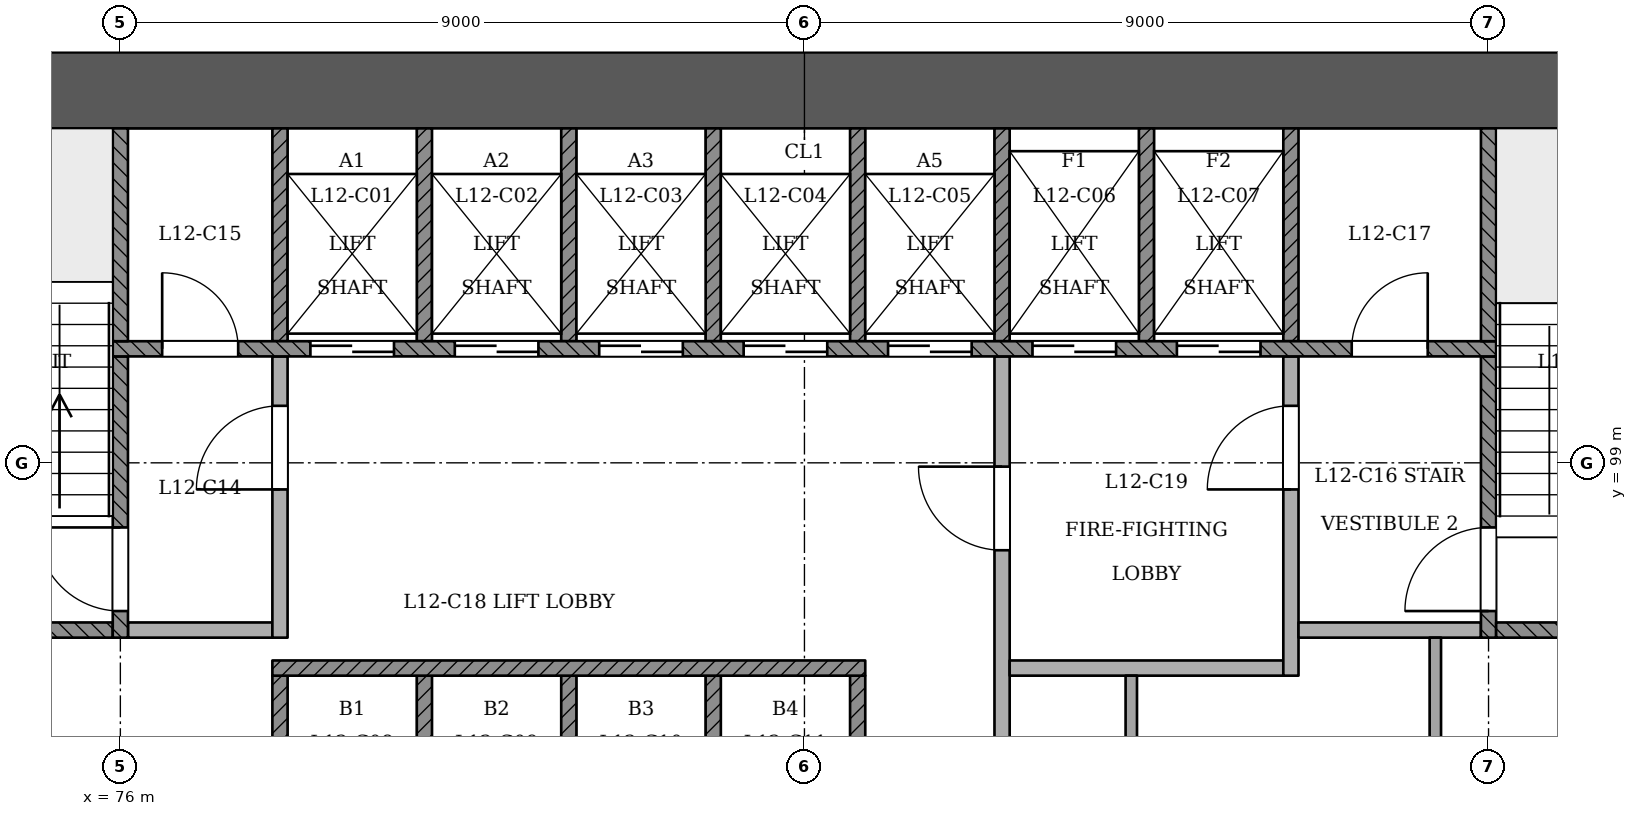
"""IFC4 building model, lengths in metres.
Left out: names, types, materials, properties, quantities, classifications, styles, units other than length and angle.
Written with IfcOpenShell. Run it as: python <this file> out.ifc"""

import sys

from ifc_helpers import new_model, si_unit, direction, frame, frame_2d, origin, place, context, subcontext, project, spatial, rectangle, extrude, element, fill, save


model = new_model("IFC4")
c1 = context("Model", 3, precision=1e-05, world=origin(), true_north=direction((0.0, 1.0)))
c2 = subcontext(c1, "Body", "Model", "MODEL_VIEW")
j1 = project(units=[si_unit("LENGTHUNIT", "METRE"), si_unit("PLANEANGLEUNIT", "RADIAN")], contexts=[c1])
p1 = place(None, origin())
s1 = spatial("IfcSite", under=j1, at=p1, CompositionType="ELEMENT")
p2 = place(p1, origin())
s2 = spatial("IfcBuilding", under=s1, at=p2, CompositionType="ELEMENT")
p3 = place(p2, frame((0.0, 0.0, 52.2)))
s3 = spatial("IfcBuildingStorey", under=s2, at=p3, CompositionType="ELEMENT", Elevation=52.2)
p4 = place(p3, frame((97.5, 103.9, 0.0), z_axis=(0.0, 0.0, 1.0), x_axis=(-1.0, 0.0, 0.0)))
e1 = element("IfcWall", 1, at=p4, inside=s3, PredefinedType="SHEAR", context=c2, shape_type="SweptSolid", body=[
    extrude(rectangle(XDim=25.5, YDim=1.0, at=frame_2d((12.75, 0.0))), origin(), (0.0, 0.0, 1.0), 3.6),
])
p5 = place(p3, frame((86.05, 58.757, 0.0), z_axis=(0.0, 0.0, 1.0), x_axis=(0.499999296855, 0.866025809745, 0.0)))
e2 = element("IfcWall", 2, at=p5, inside=s3, PredefinedType="PARTITIONING", context=c2, shape_type="SweptSolid", body=[
    extrude(rectangle(XDim=43.792, YDim=0.15, at=frame_2d((21.896, 0.0))), origin(), (0.0, 0.0, 1.0), 2.7),
])
p6 = place(p5, frame((3.598, 0.0, 0.0)))
e3 = element("IfcOpeningElement", 3, at=p6, cuts=e2, PredefinedType="OPENING", context=c2, shape_type="SweptSolid", body=[
    extrude(rectangle(XDim=1.2, YDim=2.1, at=frame_2d((0.6, 1.05))), frame((0.0, 0.085, 0.0), z_axis=(0.0, -1.0, 0.0), x_axis=(1.0, 0.0, 0.0)), (0.0, 0.0, 1.0), 0.171),
])
p7 = place(p5, frame((11.176, 0.0, 0.0)))
e4 = element("IfcOpeningElement", 4, at=p7, cuts=e2, PredefinedType="OPENING", context=c2, shape_type="SweptSolid", body=[
    extrude(rectangle(XDim=1.0, YDim=2.1, at=frame_2d((0.5, 1.05))), frame((0.0, 0.085, 0.0), z_axis=(0.0, -1.0, 0.0), x_axis=(1.0, 0.0, 0.0)), (0.0, 0.0, 1.0), 0.171),
])
p8 = place(p5, frame((13.616, 0.0, 0.0)))
e5 = element("IfcOpeningElement", 5, at=p8, cuts=e2, PredefinedType="OPENING", context=c2, shape_type="SweptSolid", body=[
    extrude(rectangle(XDim=1.0, YDim=2.1, at=frame_2d((0.5, 1.05))), frame((0.0, 0.085, 0.0), z_axis=(0.0, -1.0, 0.0), x_axis=(1.0, 0.0, 0.0)), (0.0, 0.0, 1.0), 0.171),
])
p9 = place(p5, frame((20.176, 0.0, 0.0)))
e6 = element("IfcOpeningElement", 6, at=p9, cuts=e2, PredefinedType="OPENING", context=c2, shape_type="SweptSolid", body=[
    extrude(rectangle(XDim=1.0, YDim=2.1, at=frame_2d((0.5, 1.05))), frame((0.0, 0.085, 0.0), z_axis=(0.0, -1.0, 0.0), x_axis=(1.0, 0.0, 0.0)), (0.0, 0.0, 1.0), 0.171),
])
p10 = place(p5, frame((22.616, 0.0, 0.0)))
e7 = element("IfcOpeningElement", 7, at=p10, cuts=e2, PredefinedType="OPENING", context=c2, shape_type="SweptSolid", body=[
    extrude(rectangle(XDim=1.0, YDim=2.1, at=frame_2d((0.5, 1.05))), frame((0.0, 0.085, 0.0), z_axis=(0.0, -1.0, 0.0), x_axis=(1.0, 0.0, 0.0)), (0.0, 0.0, 1.0), 0.171),
])
p11 = place(p5, frame((29.176, 0.0, 0.0)))
e8 = element("IfcOpeningElement", 8, at=p11, cuts=e2, PredefinedType="OPENING", context=c2, shape_type="SweptSolid", body=[
    extrude(rectangle(XDim=1.0, YDim=2.1, at=frame_2d((0.5, 1.05))), frame((0.0, 0.085, 0.0), z_axis=(0.0, -1.0, 0.0), x_axis=(1.0, 0.0, 0.0)), (0.0, 0.0, 1.0), 0.171),
])
p12 = place(p5, frame((31.616, 0.0, 0.0)))
e9 = element("IfcOpeningElement", 9, at=p12, cuts=e2, PredefinedType="OPENING", context=c2, shape_type="SweptSolid", body=[
    extrude(rectangle(XDim=1.0, YDim=2.1, at=frame_2d((0.5, 1.05))), frame((0.0, 0.085, 0.0), z_axis=(0.0, -1.0, 0.0), x_axis=(1.0, 0.0, 0.0)), (0.0, 0.0, 1.0), 0.171),
])
p13 = place(p5, frame((38.176, 0.0, 0.0)))
e10 = element("IfcOpeningElement", 10, at=p13, cuts=e2, PredefinedType="OPENING", context=c2, shape_type="SweptSolid", body=[
    extrude(rectangle(XDim=1.0, YDim=2.1, at=frame_2d((0.5, 1.05))), frame((0.0, 0.085, 0.0), z_axis=(0.0, -1.0, 0.0), x_axis=(1.0, 0.0, 0.0)), (0.0, 0.0, 1.0), 0.171),
])
p14 = place(p5, frame((41.344, 0.0, 0.0)))
e11 = element("IfcOpeningElement", 11, at=p14, cuts=e2, PredefinedType="OPENING", context=c2, shape_type="SweptSolid", body=[
    extrude(rectangle(XDim=1.0, YDim=2.1, at=frame_2d((0.5, 1.05))), frame((0.0, 0.085, 0.0), z_axis=(0.0, -1.0, 0.0), x_axis=(1.0, 0.0, 0.0)), (0.0, 0.0, 1.0), 0.171),
])
for number, where, z_axis, x_axis in (
    (12, (78.1, 93.4, 0.0), (0.0, 0.0, 1.0), (0.0, 1.0, 0.0)),
    (13, (80.0, 93.4, 0.0), (0.0, 0.0, 1.0), (0.0, 1.0, 0.0)),
    (14, (81.9, 93.4, 0.0), (0.0, 0.0, 1.0), (0.0, 1.0, 0.0)),
    (15, (83.8, 93.4, 0.0), (0.0, 0.0, 1.0), (0.0, 1.0, 0.0)),
    (16, (85.7, 93.4, 0.0), (0.0, 0.0, 1.0), (0.0, 1.0, 0.0)),
):
    element("IfcWall", number, at=place(p3, frame(where, z_axis=z_axis, x_axis=x_axis)), inside=s3, PredefinedType="SOLIDWALL", context=c2, shape_type="SweptSolid", body=[
        extrude(rectangle(XDim=2.8, YDim=0.2, at=frame_2d((1.4, 0.0))), origin(), (0.0, 0.0, 1.0), 3.1),
    ])
p15 = place(p3, frame((87.6, 93.4, 0.0), z_axis=(0.0, 0.0, 1.0), x_axis=(0.0, 1.0, 0.0)))
e17 = element("IfcWall", 17, at=p15, inside=s3, PredefinedType="PARTITIONING", context=c2, shape_type="SweptSolid", body=[
    extrude(rectangle(XDim=7.0, YDim=0.2, at=frame_2d((3.5, 0.0))), origin(), (0.0, 0.0, 1.0), 3.1),
])
p16 = place(p15, frame((4.45, 0.0, 0.0)))
e18 = element("IfcOpeningElement", 18, at=p16, cuts=e17, PredefinedType="OPENING", context=c2, shape_type="SweptSolid", body=[
    extrude(rectangle(XDim=1.1, YDim=2.1, at=frame_2d((0.55, 1.05))), frame((0.0, 0.11, 0.0), z_axis=(0.0, -1.0, 0.0), x_axis=(1.0, 0.0, 0.0)), (0.0, 0.0, 1.0), 0.221),
])
p17 = place(p3, frame((89.3, 93.4, 0.0), z_axis=(0.0, 0.0, 1.0), x_axis=(0.0, 1.0, 0.0)))
e19 = element("IfcWall", 19, at=p17, inside=s3, PredefinedType="PARTITIONING", context=c2, shape_type="SweptSolid", body=[
    extrude(rectangle(XDim=2.8, YDim=0.15, at=frame_2d((1.4, 0.0))), origin(), (0.0, 0.0, 1.0), 3.1),
])
p18 = place(p3, frame((93.3, 93.4, 0.0), z_axis=(0.0, 0.0, 1.0), x_axis=(0.0, 1.0, 0.0)))
e20 = element("IfcWall", 20, at=p18, inside=s3, PredefinedType="PARTITIONING", context=c2, shape_type="SweptSolid", body=[
    extrude(rectangle(XDim=3.3, YDim=0.15, at=frame_2d((1.65, 0.0))), origin(), (0.0, 0.0, 1.0), 3.1),
])
p19 = place(p3, frame((78.0, 96.3, 0.0), z_axis=(0.0, 0.0, 1.0), x_axis=(1.0, 0.0, 0.0)))
e21 = element("IfcWall", 21, at=p19, inside=s3, PredefinedType="SOLIDWALL", context=c2, shape_type="SweptSolid", body=[
    extrude(rectangle(XDim=7.8, YDim=0.2, at=frame_2d((3.9, 0.0))), origin(), (0.0, 0.0, 1.0), 3.1),
])
p20 = place(p3, frame((87.7, 96.3, 0.0), z_axis=(0.0, 0.0, 1.0), x_axis=(1.0, 0.0, 0.0)))
e22 = element("IfcWall", 22, at=p20, inside=s3, PredefinedType="PARTITIONING", context=c2, shape_type="SweptSolid", body=[
    extrude(rectangle(XDim=3.6, YDim=0.2, at=frame_2d((1.8, 0.0))), origin(), (0.0, 0.0, 1.0), 3.1),
])
p21 = place(p3, frame((91.4, 96.2, 0.0), z_axis=(0.0, 0.0, 1.0), x_axis=(0.0, 1.0, 0.0)))
e23 = element("IfcWall", 23, at=p21, inside=s3, PredefinedType="PARTITIONING", context=c2, shape_type="SweptSolid", body=[
    extrude(rectangle(XDim=4.2, YDim=0.2, at=frame_2d((2.1, 0.0))), origin(), (0.0, 0.0, 1.0), 3.1),
])
p22 = place(p21, frame((2.45, 0.0, 0.0)))
e24 = element("IfcOpeningElement", 24, at=p22, cuts=e23, PredefinedType="OPENING", context=c2, shape_type="SweptSolid", body=[
    extrude(rectangle(XDim=1.1, YDim=2.1, at=frame_2d((0.55, 1.05))), frame((0.0, 0.11, 0.0), z_axis=(0.0, -1.0, 0.0), x_axis=(1.0, 0.0, 0.0)), (0.0, 0.0, 1.0), 0.221),
])
p23 = place(p3, frame((73.0, 96.8, 0.0), z_axis=(0.0, 0.0, 1.0), x_axis=(1.0, 0.0, 0.0)))
e25 = element("IfcWall", 25, at=p23, inside=s3, PredefinedType="SOLIDWALL", context=c2, shape_type="SweptSolid", body=[
    extrude(rectangle(XDim=2.9, YDim=0.2, at=frame_2d((1.45, 0.0))), origin(), (0.0, 0.0, 1.0), 3.1),
])
p24 = place(p3, frame((76.0, 96.7, 0.0), z_axis=(0.0, 0.0, 1.0), x_axis=(0.0, 1.0, 0.0)))
e26 = element("IfcWall", 26, at=p24, inside=s3, PredefinedType="SOLIDWALL", context=c2, shape_type="SweptSolid", body=[
    extrude(rectangle(XDim=3.7, YDim=0.2, at=frame_2d((1.85, 0.0))), origin(), (0.0, 0.0, 1.0), 3.1),
])
p25 = place(p24, frame((0.35, 0.0, 0.0)))
e27 = element("IfcOpeningElement", 27, at=p25, cuts=e26, PredefinedType="OPENING", context=c2, shape_type="SweptSolid", body=[
    extrude(rectangle(XDim=1.1, YDim=2.1, at=frame_2d((0.55, 1.05))), frame((0.0, 0.11, 0.0), z_axis=(0.0, -1.0, 0.0), x_axis=(1.0, 0.0, 0.0)), (0.0, 0.0, 1.0), 0.221),
])
p26 = place(p3, frame((76.1, 96.8, 0.0), z_axis=(0.0, 0.0, 1.0), x_axis=(1.0, 0.0, 0.0)))
e28 = element("IfcWall", 28, at=p26, inside=s3, PredefinedType="PARTITIONING", context=c2, shape_type="SweptSolid", body=[
    extrude(rectangle(XDim=1.9, YDim=0.2, at=frame_2d((0.95, 0.0))), origin(), (0.0, 0.0, 1.0), 3.1),
])
p27 = place(p3, frame((78.1, 96.7, 0.0), z_axis=(0.0, 0.0, 1.0), x_axis=(0.0, 1.0, 0.0)))
e29 = element("IfcWall", 29, at=p27, inside=s3, PredefinedType="PARTITIONING", context=c2, shape_type="SweptSolid", body=[
    extrude(rectangle(XDim=3.7, YDim=0.2, at=frame_2d((1.85, 0.0))), origin(), (0.0, 0.0, 1.0), 3.1),
])
p28 = place(p27, frame((1.95, 0.0, 0.0)))
e30 = element("IfcOpeningElement", 30, at=p28, cuts=e29, PredefinedType="OPENING", context=c2, shape_type="SweptSolid", body=[
    extrude(rectangle(XDim=1.1, YDim=2.1, at=frame_2d((0.55, 1.05))), frame((0.0, 0.11, 0.0), z_axis=(0.0, -1.0, 0.0), x_axis=(1.0, 0.0, 0.0)), (0.0, 0.0, 1.0), 0.221),
])
p29 = place(p3, frame((91.5, 96.8, 0.0), z_axis=(0.0, 0.0, 1.0), x_axis=(1.0, 0.0, 0.0)))
e31 = element("IfcWall", 31, at=p29, inside=s3, PredefinedType="PARTITIONING", context=c2, shape_type="SweptSolid", body=[
    extrude(rectangle(XDim=2.4, YDim=0.2, at=frame_2d((1.2, 0.0))), origin(), (0.0, 0.0, 1.0), 3.1),
])
p30 = place(p3, frame((94.0, 96.7, 0.0), z_axis=(0.0, 0.0, 1.0), x_axis=(0.0, 1.0, 0.0)))
e32 = element("IfcWall", 32, at=p30, inside=s3, PredefinedType="SOLIDWALL", context=c2, shape_type="SweptSolid", body=[
    extrude(rectangle(XDim=3.7, YDim=0.2, at=frame_2d((1.85, 0.0))), origin(), (0.0, 0.0, 1.0), 3.1),
])
p31 = place(p30, frame((0.35, 0.0, 0.0)))
e33 = element("IfcOpeningElement", 33, at=p31, cuts=e32, PredefinedType="OPENING", context=c2, shape_type="SweptSolid", body=[
    extrude(rectangle(XDim=1.1, YDim=2.1, at=frame_2d((0.55, 1.05))), frame((0.0, 0.11, 0.0), z_axis=(0.0, -1.0, 0.0), x_axis=(1.0, 0.0, 0.0)), (0.0, 0.0, 1.0), 0.221),
])
p32 = place(p3, frame((94.1, 96.8, 0.0), z_axis=(0.0, 0.0, 1.0), x_axis=(1.0, 0.0, 0.0)))
e34 = element("IfcWall", 34, at=p32, inside=s3, PredefinedType="SOLIDWALL", context=c2, shape_type="SweptSolid", body=[
    extrude(rectangle(XDim=2.9, YDim=0.2, at=frame_2d((1.45, 0.0))), origin(), (0.0, 0.0, 1.0), 3.1),
])
p33 = place(p3, frame((75.9, 100.5, 0.0), z_axis=(0.0, 0.0, 1.0), x_axis=(1.0, 0.0, 0.0)))
e35 = element("IfcWall", 35, at=p33, inside=s3, PredefinedType="SOLIDWALL", context=c2, shape_type="SweptSolid", body=[
    extrude(rectangle(XDim=18.2, YDim=0.2, at=frame_2d((9.1, 0.0))), origin(), (0.0, 0.0, 1.0), 3.1),
])
p34 = place(p33, frame((2.6, 0.0, 0.0)))
e36 = element("IfcOpeningElement", 36, at=p34, cuts=e35, PredefinedType="OPENING", context=c2, shape_type="SweptSolid", body=[
    extrude(rectangle(XDim=1.1, YDim=2.1, at=frame_2d((0.55, 1.05))), frame((0.0, 0.11, 0.0), z_axis=(0.0, -1.0, 0.0), x_axis=(1.0, 0.0, 0.0)), (0.0, 0.0, 1.0), 0.221),
])
p35 = place(p33, frame((4.5, 0.0, 0.0)))
e37 = element("IfcOpeningElement", 37, at=p35, cuts=e35, PredefinedType="OPENING", context=c2, shape_type="SweptSolid", body=[
    extrude(rectangle(XDim=1.1, YDim=2.1, at=frame_2d((0.55, 1.05))), frame((0.0, 0.11, 0.0), z_axis=(0.0, -1.0, 0.0), x_axis=(1.0, 0.0, 0.0)), (0.0, 0.0, 1.0), 0.221),
])
p36 = place(p33, frame((6.4, 0.0, 0.0)))
e38 = element("IfcOpeningElement", 38, at=p36, cuts=e35, PredefinedType="OPENING", context=c2, shape_type="SweptSolid", body=[
    extrude(rectangle(XDim=1.1, YDim=2.1, at=frame_2d((0.55, 1.05))), frame((0.0, 0.11, 0.0), z_axis=(0.0, -1.0, 0.0), x_axis=(1.0, 0.0, 0.0)), (0.0, 0.0, 1.0), 0.221),
])
p37 = place(p33, frame((8.3, 0.0, 0.0)))
e39 = element("IfcOpeningElement", 39, at=p37, cuts=e35, PredefinedType="OPENING", context=c2, shape_type="SweptSolid", body=[
    extrude(rectangle(XDim=1.1, YDim=2.1, at=frame_2d((0.55, 1.05))), frame((0.0, 0.11, 0.0), z_axis=(0.0, -1.0, 0.0), x_axis=(1.0, 0.0, 0.0)), (0.0, 0.0, 1.0), 0.221),
])
p38 = place(p33, frame((10.2, 0.0, 0.0)))
e40 = element("IfcOpeningElement", 40, at=p38, cuts=e35, PredefinedType="OPENING", context=c2, shape_type="SweptSolid", body=[
    extrude(rectangle(XDim=1.1, YDim=2.1, at=frame_2d((0.55, 1.05))), frame((0.0, 0.11, 0.0), z_axis=(0.0, -1.0, 0.0), x_axis=(1.0, 0.0, 0.0)), (0.0, 0.0, 1.0), 0.221),
])
p39 = place(p33, frame((12.1, 0.0, 0.0)))
e41 = element("IfcOpeningElement", 41, at=p39, cuts=e35, PredefinedType="OPENING", context=c2, shape_type="SweptSolid", body=[
    extrude(rectangle(XDim=1.1, YDim=2.1, at=frame_2d((0.55, 1.05))), frame((0.0, 0.11, 0.0), z_axis=(0.0, -1.0, 0.0), x_axis=(1.0, 0.0, 0.0)), (0.0, 0.0, 1.0), 0.221),
])
p40 = place(p33, frame((14.0, 0.0, 0.0)))
e42 = element("IfcOpeningElement", 42, at=p40, cuts=e35, PredefinedType="OPENING", context=c2, shape_type="SweptSolid", body=[
    extrude(rectangle(XDim=1.1, YDim=2.1, at=frame_2d((0.55, 1.05))), frame((0.0, 0.11, 0.0), z_axis=(0.0, -1.0, 0.0), x_axis=(1.0, 0.0, 0.0)), (0.0, 0.0, 1.0), 0.221),
])
p41 = place(p33, frame((0.65, 0.0, 0.0)))
e43 = element("IfcOpeningElement", 43, at=p41, cuts=e35, PredefinedType="OPENING", context=c2, shape_type="SweptSolid", body=[
    extrude(rectangle(XDim=1.0, YDim=2.1, at=frame_2d((0.5, 1.05))), frame((0.0, 0.11, 0.0), z_axis=(0.0, -1.0, 0.0), x_axis=(1.0, 0.0, 0.0)), (0.0, 0.0, 1.0), 0.221),
])
p42 = place(p33, frame((16.3, 0.0, 0.0)))
e44 = element("IfcOpeningElement", 44, at=p42, cuts=e35, PredefinedType="OPENING", context=c2, shape_type="SweptSolid", body=[
    extrude(rectangle(XDim=1.0, YDim=2.1, at=frame_2d((0.5, 1.05))), frame((0.0, 0.11, 0.0), z_axis=(0.0, -1.0, 0.0), x_axis=(1.0, 0.0, 0.0)), (0.0, 0.0, 1.0), 0.221),
])
for number, where, z_axis, x_axis in (
    (45, (76.0, 100.6, 0.0), (0.0, 0.0, 1.0), (0.0, 1.0, 0.0)),
    (46, (78.1, 100.6, 0.0), (0.0, 0.0, 1.0), (0.0, 1.0, 0.0)),
    (47, (80.0, 100.6, 0.0), (0.0, 0.0, 1.0), (0.0, 1.0, 0.0)),
    (48, (81.9, 100.6, 0.0), (0.0, 0.0, 1.0), (0.0, 1.0, 0.0)),
    (49, (83.8, 100.6, 0.0), (0.0, 0.0, 1.0), (0.0, 1.0, 0.0)),
    (50, (85.7, 100.6, 0.0), (0.0, 0.0, 1.0), (0.0, 1.0, 0.0)),
    (51, (87.6, 100.6, 0.0), (0.0, 0.0, 1.0), (0.0, 1.0, 0.0)),
    (52, (89.5, 100.6, 0.0), (0.0, 0.0, 1.0), (0.0, 1.0, 0.0)),
    (53, (91.4, 100.6, 0.0), (0.0, 0.0, 1.0), (0.0, 1.0, 0.0)),
    (54, (94.0, 100.6, 0.0), (0.0, 0.0, 1.0), (0.0, 1.0, 0.0)),
):
    element("IfcWall", number, at=place(p3, frame(where, z_axis=z_axis, x_axis=x_axis)), inside=s3, PredefinedType="SOLIDWALL", context=c2, shape_type="SweptSolid", body=[
        extrude(rectangle(XDim=2.8, YDim=0.2, at=frame_2d((1.4, 0.0))), origin(), (0.0, 0.0, 1.0), 3.1),
    ])
p43 = place(p34, origin())
e55 = element("IfcDoor", 55, at=p43, inside=s3, OperationType="SLIDING_TO_RIGHT", PredefinedType="NOTDEFINED", context=c2, shape_type="SweptSolid", body=[
    extrude(rectangle(XDim=1.1, YDim=2.1, at=frame_2d((0.55, 1.05))), frame((0.0, 0.025, 0.0), z_axis=(0.0, -1.0, 0.0), x_axis=(1.0, 0.0, 0.0)), (0.0, 0.0, 1.0), 0.05),
])
fill(e36, e55)
p44 = place(p35, origin())
e56 = element("IfcDoor", 56, at=p44, inside=s3, OperationType="SLIDING_TO_LEFT", PredefinedType="NOTDEFINED", context=c2, shape_type="SweptSolid", body=[
    extrude(rectangle(XDim=1.1, YDim=2.1, at=frame_2d((0.55, 1.05))), frame((0.0, 0.025, 0.0), z_axis=(0.0, -1.0, 0.0), x_axis=(1.0, 0.0, 0.0)), (0.0, 0.0, 1.0), 0.05),
])
fill(e37, e56)
p45 = place(p36, origin())
e57 = element("IfcDoor", 57, at=p45, inside=s3, OperationType="SLIDING_TO_RIGHT", PredefinedType="NOTDEFINED", context=c2, shape_type="SweptSolid", body=[
    extrude(rectangle(XDim=1.1, YDim=2.1, at=frame_2d((0.55, 1.05))), frame((0.0, 0.025, 0.0), z_axis=(0.0, -1.0, 0.0), x_axis=(1.0, 0.0, 0.0)), (0.0, 0.0, 1.0), 0.05),
])
fill(e38, e57)
p46 = place(p37, origin())
e58 = element("IfcDoor", 58, at=p46, inside=s3, OperationType="SLIDING_TO_LEFT", PredefinedType="NOTDEFINED", context=c2, shape_type="SweptSolid", body=[
    extrude(rectangle(XDim=1.1, YDim=2.1, at=frame_2d((0.55, 1.05))), frame((0.0, 0.025, 0.0), z_axis=(0.0, -1.0, 0.0), x_axis=(1.0, 0.0, 0.0)), (0.0, 0.0, 1.0), 0.05),
])
fill(e39, e58)
p47 = place(p38, origin())
e59 = element("IfcDoor", 59, at=p47, inside=s3, OperationType="SLIDING_TO_RIGHT", PredefinedType="NOTDEFINED", context=c2, shape_type="SweptSolid", body=[
    extrude(rectangle(XDim=1.1, YDim=2.1, at=frame_2d((0.55, 1.05))), frame((0.0, 0.025, 0.0), z_axis=(0.0, -1.0, 0.0), x_axis=(1.0, 0.0, 0.0)), (0.0, 0.0, 1.0), 0.05),
])
fill(e40, e59)
p48 = place(p39, origin())
e60 = element("IfcDoor", 60, at=p48, inside=s3, OperationType="SLIDING_TO_RIGHT", PredefinedType="NOTDEFINED", context=c2, shape_type="SweptSolid", body=[
    extrude(rectangle(XDim=1.1, YDim=2.1, at=frame_2d((0.55, 1.05))), frame((0.0, 0.025, 0.0), z_axis=(0.0, -1.0, 0.0), x_axis=(1.0, 0.0, 0.0)), (0.0, 0.0, 1.0), 0.05),
])
fill(e41, e60)
p49 = place(p40, origin())
e61 = element("IfcDoor", 61, at=p49, inside=s3, OperationType="SLIDING_TO_LEFT", PredefinedType="NOTDEFINED", context=c2, shape_type="SweptSolid", body=[
    extrude(rectangle(XDim=1.1, YDim=2.1, at=frame_2d((0.55, 1.05))), frame((0.0, 0.025, 0.0), z_axis=(0.0, -1.0, 0.0), x_axis=(1.0, 0.0, 0.0)), (0.0, 0.0, 1.0), 0.05),
])
fill(e42, e61)
p50 = place(p25, origin())
e62 = element("IfcDoor", 62, at=p50, inside=s3, OperationType="SINGLE_SWING_RIGHT", PredefinedType="NOTDEFINED", context=c2, shape_type="SweptSolid", body=[
    extrude(rectangle(XDim=1.1, YDim=2.1, at=frame_2d((0.55, 1.05))), frame((0.0, 0.025, 0.0), z_axis=(0.0, -1.0, 0.0), x_axis=(1.0, 0.0, 0.0)), (0.0, 0.0, 1.0), 0.05),
])
fill(e27, e62)
p51 = place(p31, origin())
e63 = element("IfcDoor", 63, at=p51, inside=s3, OperationType="SINGLE_SWING_LEFT", PredefinedType="NOTDEFINED", context=c2, shape_type="SweptSolid", body=[
    extrude(rectangle(XDim=1.1, YDim=2.1, at=frame_2d((0.55, 1.05))), frame((0.0, 0.025, 0.0), z_axis=(0.0, -1.0, 0.0), x_axis=(1.0, 0.0, 0.0)), (0.0, 0.0, 1.0), 0.05),
])
fill(e33, e63)
p52 = place(p28, origin())
e64 = element("IfcDoor", 64, at=p52, inside=s3, OperationType="SINGLE_SWING_LEFT", PredefinedType="NOTDEFINED", context=c2, shape_type="SweptSolid", body=[
    extrude(rectangle(XDim=1.1, YDim=2.1, at=frame_2d((0.55, 1.05))), frame((0.0, 0.025, 0.0), z_axis=(0.0, -1.0, 0.0), x_axis=(1.0, 0.0, 0.0)), (0.0, 0.0, 1.0), 0.05),
])
fill(e30, e64)
p53 = place(p16, origin())
e65 = element("IfcDoor", 65, at=p53, inside=s3, OperationType="SINGLE_SWING_RIGHT", PredefinedType="NOTDEFINED", context=c2, shape_type="SweptSolid", body=[
    extrude(rectangle(XDim=1.1, YDim=2.1, at=frame_2d((0.55, 1.05))), frame((0.0, 0.025, 0.0), z_axis=(0.0, -1.0, 0.0), x_axis=(1.0, 0.0, 0.0)), (0.0, 0.0, 1.0), 0.05),
])
fill(e18, e65)
p54 = place(p22, origin())
e66 = element("IfcDoor", 66, at=p54, inside=s3, OperationType="SINGLE_SWING_LEFT", PredefinedType="NOTDEFINED", context=c2, shape_type="SweptSolid", body=[
    extrude(rectangle(XDim=1.1, YDim=2.1, at=frame_2d((0.55, 1.05))), frame((0.0, 0.025, 0.0), z_axis=(0.0, -1.0, 0.0), x_axis=(1.0, 0.0, 0.0)), (0.0, 0.0, 1.0), 0.05),
])
fill(e24, e66)
p55 = place(p41, origin())
e67 = element("IfcDoor", 67, at=p55, inside=s3, OperationType="SINGLE_SWING_LEFT", PredefinedType="NOTDEFINED", context=c2, shape_type="SweptSolid", body=[
    extrude(rectangle(XDim=1.0, YDim=2.1, at=frame_2d((0.5, 1.05))), frame((0.0, 0.025, 0.0), z_axis=(0.0, -1.0, 0.0), x_axis=(1.0, 0.0, 0.0)), (0.0, 0.0, 1.0), 0.05),
])
fill(e43, e67)
p56 = place(p42, origin())
e68 = element("IfcDoor", 68, at=p56, inside=s3, OperationType="SINGLE_SWING_RIGHT", PredefinedType="NOTDEFINED", context=c2, shape_type="SweptSolid", body=[
    extrude(rectangle(XDim=1.0, YDim=2.1, at=frame_2d((0.5, 1.05))), frame((0.0, 0.025, 0.0), z_axis=(0.0, -1.0, 0.0), x_axis=(1.0, 0.0, 0.0)), (0.0, 0.0, 1.0), 0.05),
])
fill(e44, e68)
save(model, sys.argv[1])
